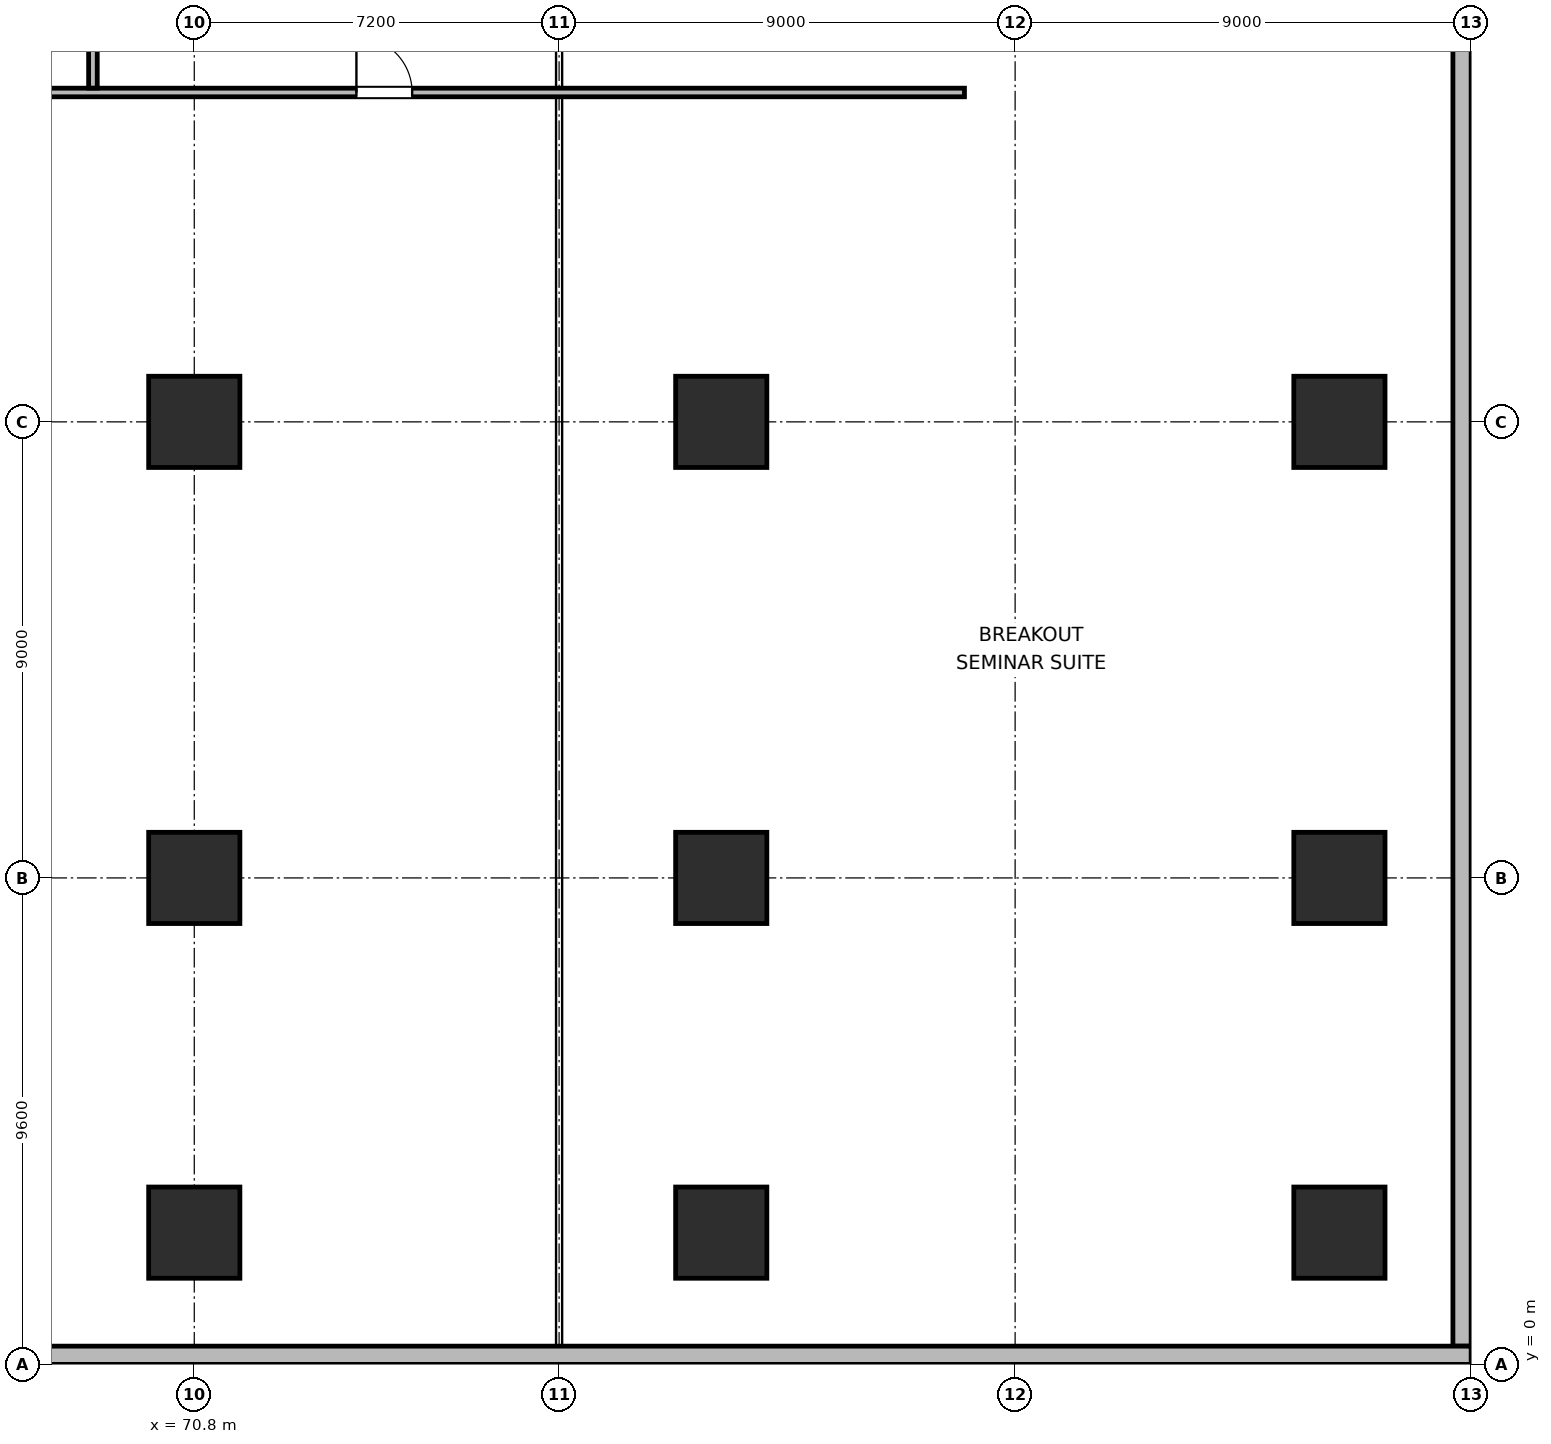
"""IFC4 building model, lengths in metres.
Left out: names, types, materials, properties, quantities, classifications, styles, units other than length and angle.
Written with IfcOpenShell. Run it as: python <this file> out.ifc"""

import sys

from ifc_helpers import new_model, si_unit, direction, frame, frame_2d, origin, origin_2d, place, context, subcontext, project, spatial, rectangle, extrude, element, fill, save


model = new_model("IFC4")
c1 = context("Model", 3, precision=1e-05, world=origin(), true_north=direction((0.0, 1.0)))
c2 = subcontext(c1, "Body", "Model", "MODEL_VIEW")
j1 = project(units=[si_unit("LENGTHUNIT", "METRE"), si_unit("PLANEANGLEUNIT", "RADIAN")], contexts=[c1])
p1 = place(None, origin())
s1 = spatial("IfcSite", under=j1, at=p1, CompositionType="ELEMENT")
p2 = place(p1, origin())
s2 = spatial("IfcBuilding", under=s1, at=p2, CompositionType="ELEMENT")
p3 = place(p2, frame((0.0, 0.0, 4.5)))
s3 = spatial("IfcBuildingStorey", under=s2, at=p3, CompositionType="ELEMENT", Elevation=4.5)
for number, where, z_axis, x_axis in (
    (1, (70.8, 2.6, 0.0), (0.0, 0.0, 1.0), (1.0, 0.0, 0.0)),
    (2, (70.8, 9.6, 0.0), (0.0, 0.0, 1.0), (1.0, 0.0, 0.0)),
    (3, (70.8, 18.6, 0.0), (0.0, 0.0, 1.0), (1.0, 0.0, 0.0)),
    (4, (81.2, 2.6, 0.0), (0.0, 0.0, 1.0), (1.0, 0.0, 0.0)),
    (5, (81.2, 9.6, 0.0), (0.0, 0.0, 1.0), (1.0, 0.0, 0.0)),
    (6, (81.2, 18.6, 0.0), (0.0, 0.0, 1.0), (1.0, 0.0, 0.0)),
    (7, (93.4, 2.6, 0.0), (0.0, 0.0, 1.0), (1.0, 0.0, 0.0)),
    (8, (93.4, 9.6, 0.0), (0.0, 0.0, 1.0), (1.0, 0.0, 0.0)),
    (9, (93.4, 18.6, 0.0), (0.0, 0.0, 1.0), (1.0, 0.0, 0.0)),
):
    element("IfcColumn", number, at=place(p3, frame(where, z_axis=z_axis, x_axis=x_axis)), inside=s3, PredefinedType="COLUMN", context=c2, shape_type="SweptSolid", body=[
        extrude(rectangle(XDim=1.8, YDim=1.8, at=origin_2d()), origin(), (0.0, 0.0, 1.0), 4.2),
    ])
p4 = place(p3, frame((95.82, 71.64, 0.0), z_axis=(0.0, 0.0, 1.0), x_axis=(0.0, -1.0, 0.0)))
e10 = element("IfcWall", 10, at=p4, inside=s3, PredefinedType="SOLIDWALL", context=c2, shape_type="SweptSolid", body=[
    extrude(rectangle(XDim=71.28, YDim=0.36, at=frame_2d((35.64, 0.0))), origin(), (0.0, 0.0, 1.0), 3.88),
])
p5 = place(p3, frame((96.0, 0.18, 0.0), z_axis=(0.0, 0.0, 1.0), x_axis=(-1.0, 0.0, 0.0)))
e11 = element("IfcWall", 11, at=p5, inside=s3, PredefinedType="SOLIDWALL", context=c2, shape_type="SweptSolid", body=[
    extrude(rectangle(XDim=39.72, YDim=0.36, at=frame_2d((19.86, 0.0))), origin(), (0.0, 0.0, 1.0), 3.88),
])
p6 = place(p3, frame((10.0, 25.1, 0.0), z_axis=(0.0, 0.0, 1.0), x_axis=(1.0, 0.0, 0.0)))
e12 = element("IfcWall", 12, at=p6, inside=s3, PredefinedType="PARTITIONING", context=c2, shape_type="SweptSolid", body=[
    extrude(rectangle(XDim=76.0, YDim=0.17, at=frame_2d((38.0, 0.0))), origin(), (0.0, 0.0, 1.0), 3.88),
])
p7 = place(p6, frame((2.2, 0.0, 0.0)))
e13 = element("IfcOpeningElement", 13, at=p7, cuts=e12, PredefinedType="OPENING", context=c2, shape_type="SweptSolid", body=[
    extrude(rectangle(XDim=1.8, YDim=2.06, at=frame_2d((0.9, 1.03))), frame((0.0, 0.095, 0.0), z_axis=(0.0, -1.0, 0.0), x_axis=(1.0, 0.0, 0.0)), (0.0, 0.0, 1.0), 0.19),
])
p8 = place(p6, frame((34.0, 0.0, 0.0)))
e14 = element("IfcOpeningElement", 14, at=p8, cuts=e12, PredefinedType="OPENING", context=c2, shape_type="SweptSolid", body=[
    extrude(rectangle(XDim=1.8, YDim=2.06, at=frame_2d((0.9, 1.03))), frame((0.0, 0.095, 0.0), z_axis=(0.0, -1.0, 0.0), x_axis=(1.0, 0.0, 0.0)), (0.0, 0.0, 1.0), 0.19),
])
p9 = place(p6, frame((64.0, 0.0, 0.0)))
e15 = element("IfcOpeningElement", 15, at=p9, cuts=e12, PredefinedType="OPENING", context=c2, shape_type="SweptSolid", body=[
    extrude(rectangle(XDim=1.1, YDim=2.05, at=frame_2d((0.55, 1.025))), frame((0.0, 0.095, 0.0), z_axis=(0.0, -1.0, 0.0), x_axis=(1.0, 0.0, 0.0)), (0.0, 0.0, 1.0), 0.19),
])
p10 = place(p3, frame((68.8, 25.187, 0.0), z_axis=(0.0, 0.0, 1.0), x_axis=(0.0, 1.0, 0.0)))
e16 = element("IfcWall", 16, at=p10, inside=s3, PredefinedType="PARTITIONING", context=c2, shape_type="SweptSolid", body=[
    extrude(rectangle(XDim=46.448, YDim=0.17, at=frame_2d((23.224, 0.0))), origin(), (0.0, 0.0, 1.0), 3.88),
])
p11 = place(p10, frame((15.913, 0.0, 0.0)))
e17 = element("IfcOpeningElement", 17, at=p11, cuts=e16, PredefinedType="OPENING", context=c2, shape_type="SweptSolid", body=[
    extrude(rectangle(XDim=1.1, YDim=2.05, at=frame_2d((0.55, 1.025))), frame((0.0, 0.095, 0.0), z_axis=(0.0, -1.0, 0.0), x_axis=(1.0, 0.0, 0.0)), (0.0, 0.0, 1.0), 0.19),
])
p12 = place(p9, origin())
e18 = element("IfcDoor", 18, at=p12, inside=s3, OperationType="SINGLE_SWING_LEFT", PredefinedType="DOOR", context=c2, shape_type="SweptSolid", body=[
    extrude(rectangle(XDim=1.1, YDim=2.05, at=frame_2d((0.55, 1.025))), frame((0.0, 0.025, 0.0), z_axis=(0.0, -1.0, 0.0), x_axis=(1.0, 0.0, 0.0)), (0.0, 0.0, 1.0), 0.05),
])
fill(e15, e18)
save(model, sys.argv[1])
